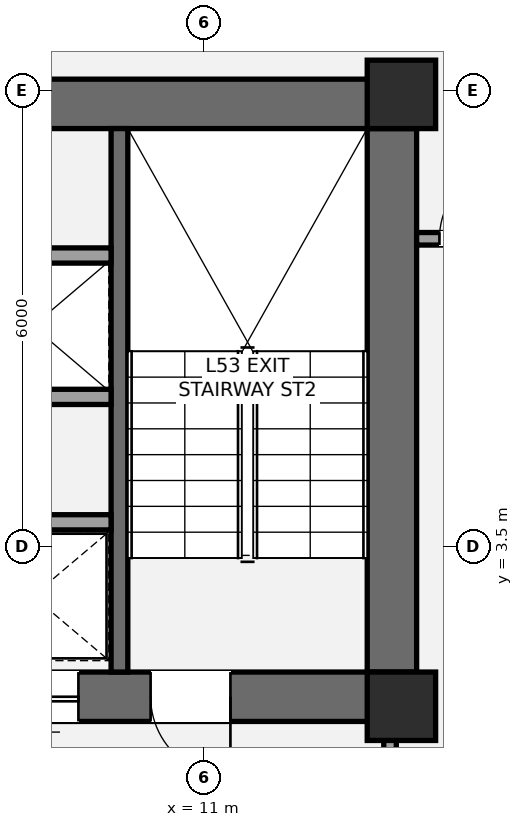
"""IFC4 building model, lengths in metres.
Left out: names, types, materials, properties, quantities, classifications, styles, units other than length and angle.
Written with IfcOpenShell. Run it as: python <this file> out.ifc"""

import sys

from ifc_helpers import new_model, si_unit, direction, frame, frame_2d, origin, origin_2d, place, context, subcontext, project, spatial, rectangle, extrude, element, fill, save


model = new_model("IFC4")
c1 = context("Model", 3, precision=1e-05, world=origin(), true_north=direction((0.0, 1.0)))
c2 = subcontext(c1, "Body", "Model", "MODEL_VIEW")
j1 = project(units=[si_unit("LENGTHUNIT", "METRE"), si_unit("PLANEANGLEUNIT", "RADIAN")], contexts=[c1])
p1 = place(None, origin())
s1 = spatial("IfcSite", under=j1, at=p1, CompositionType="ELEMENT")
p2 = place(p1, origin())
s2 = spatial("IfcBuilding", under=s1, at=p2, CompositionType="ELEMENT")
p3 = place(p2, frame((0.0, 0.0, 191.8)))
s3 = spatial("IfcBuildingStorey", under=s2, at=p3, CompositionType="ELEMENT", Elevation=191.8)
p4 = place(p3, frame((13.475, 1.2, 0.0), z_axis=(0.0, 0.0, 1.0), x_axis=(0.0, 1.0, 0.0)))
e1 = element("IfcWall", 1, at=p4, inside=s3, PredefinedType="SHEAR", context=c2, shape_type="SweptSolid", body=[
    extrude(rectangle(XDim=8.45, YDim=0.65, at=frame_2d((4.225, 0.0))), origin(), (0.0, 0.0, 1.0), 3.2),
])
p5 = place(p3, frame((4.475, 9.325, 0.0), z_axis=(0.0, 0.0, 1.0), x_axis=(1.0, 0.0, 0.0)))
e2 = element("IfcWall", 2, at=p5, inside=s3, PredefinedType="SHEAR", context=c2, shape_type="SweptSolid", body=[
    extrude(rectangle(XDim=9.325, YDim=0.65, at=frame_2d((4.663, 0.0))), origin(), (0.0, 0.0, 1.0), 3.2),
])
p6 = place(p3, frame((13.8, 1.525, 0.0), z_axis=(0.0, 0.0, 1.0), x_axis=(-1.0, 0.0, 0.0)))
e3 = element("IfcWall", 3, at=p6, inside=s3, PredefinedType="SHEAR", context=c2, shape_type="SweptSolid", body=[
    extrude(rectangle(XDim=8.925, YDim=0.65, at=frame_2d((4.462, 0.0))), origin(), (0.0, 0.0, 1.0), 3.2),
])
p7 = place(p6, frame((2.45, 0.0, 0.0)))
e4 = element("IfcOpeningElement", 4, at=p7, cuts=e3, PredefinedType="OPENING", context=c2, shape_type="SweptSolid", body=[
    extrude(rectangle(XDim=1.05, YDim=2.15, at=frame_2d((0.525, 1.075))), frame((0.0, 0.335, 0.0), z_axis=(0.0, -1.0, 0.0), x_axis=(1.0, 0.0, 0.0)), (0.0, 0.0, 1.0), 0.67),
])
p8 = place(p6, frame((4.45, 0.0, 0.0)))
e5 = element("IfcOpeningElement", 5, at=p8, cuts=e3, PredefinedType="OPENING", context=c2, shape_type="SweptSolid", body=[
    extrude(rectangle(XDim=1.1, YDim=2.2, at=frame_2d((0.55, 1.1))), frame((0.0, 0.335, 0.0), z_axis=(0.0, -1.0, 0.0), x_axis=(1.0, 0.0, 0.0)), (0.0, 0.0, 1.0), 0.67),
])
p9 = place(p3, frame((9.89, 1.85, 0.0), z_axis=(0.0, 0.0, 1.0), x_axis=(0.0, 1.0, 0.0)))
e6 = element("IfcWall", 6, at=p9, inside=s3, PredefinedType="SHEAR", context=c2, shape_type="SweptSolid", body=[
    extrude(rectangle(XDim=7.15, YDim=0.22, at=frame_2d((3.575, 0.0))), origin(), (0.0, 0.0, 1.0), 3.2),
])
for number, where, z_axis, x_axis in (
    (7, (13.6, 1.4, 0.0), (0.0, 0.0, 1.0), (1.0, 0.0, 0.0)),
    (8, (13.6, 9.45, 0.0), (0.0, 0.0, 1.0), (1.0, 0.0, 0.0)),
):
    element("IfcColumn", number, at=place(p3, frame(where, z_axis=z_axis, x_axis=x_axis)), inside=s3, PredefinedType="COLUMN", context=c2, shape_type="SweptSolid", body=[
        extrude(rectangle(XDim=0.9, YDim=0.9, at=origin_2d()), origin(), (0.0, 0.0, 1.0), 3.2),
    ])
p10 = place(p3, frame((13.45, -2.15, 0.0), z_axis=(0.0, 0.0, 1.0), x_axis=(0.0, 1.0, 0.0)))
e9 = element("IfcWall", 9, at=p10, inside=s3, PredefinedType="PARTITIONING", context=c2, shape_type="SweptSolid", body=[
    extrude(rectangle(XDim=3.4, YDim=0.165, at=frame_2d((1.7, 0.0))), origin(), (0.0, 0.0, 1.0), 2.473),
])
p11 = place(p10, frame((1.15, 0.0, 0.0)))
e10 = element("IfcOpeningElement", 10, at=p11, cuts=e9, PredefinedType="OPENING", context=c2, shape_type="SweptSolid", body=[
    extrude(rectangle(XDim=1.05, YDim=2.15, at=frame_2d((0.525, 1.075))), frame((0.0, 0.093, 0.0), z_axis=(0.0, -1.0, 0.0), x_axis=(1.0, 0.0, 0.0)), (0.0, 0.0, 1.0), 0.185),
])
p12 = place(p3, frame((5.525, 3.82, 0.0), z_axis=(0.0, 0.0, 1.0), x_axis=(1.0, 0.0, 0.0)))
e11 = element("IfcWall", 11, at=p12, inside=s3, PredefinedType="SOLIDWALL", context=c2, shape_type="SweptSolid", body=[
    extrude(rectangle(XDim=4.255, YDim=0.2, at=frame_2d((2.127, 0.0))), origin(), (0.0, 0.0, 1.0), 3.02),
])
p13 = place(p12, frame((0.65, 0.0, 0.0)))
e12 = element("IfcOpeningElement", 12, at=p13, cuts=e11, PredefinedType="OPENING", context=c2, shape_type="SweptSolid", body=[
    extrude(rectangle(XDim=1.2, YDim=2.2, at=frame_2d((0.6, 1.1))), frame((0.0, 0.11, 0.0), z_axis=(0.0, -1.0, 0.0), x_axis=(1.0, 0.0, 0.0)), (0.0, 0.0, 1.0), 0.22),
])
for number, where, z_axis, x_axis in (
    (13, (5.525, 5.47, 0.0), (0.0, 0.0, 1.0), (1.0, 0.0, 0.0)),
    (14, (5.525, 7.33, 0.0), (0.0, 0.0, 1.0), (1.0, 0.0, 0.0)),
):
    element("IfcWall", number, at=place(p3, frame(where, z_axis=z_axis, x_axis=x_axis)), inside=s3, PredefinedType="SOLIDWALL", context=c2, shape_type="SweptSolid", body=[
        extrude(rectangle(XDim=4.255, YDim=0.2, at=frame_2d((2.127, 0.0))), origin(), (0.0, 0.0, 1.0), 3.02),
    ])
p14 = place(p3, frame((13.8, 7.55, 0.0), z_axis=(0.0, 0.0, 1.0), x_axis=(1.0, 0.0, 0.0)))
e15 = element("IfcWall", 15, at=p14, inside=s3, PredefinedType="PARTITIONING", context=c2, shape_type="SweptSolid", body=[
    extrude(rectangle(XDim=1.75, YDim=0.165, at=frame_2d((0.875, 0.0))), origin(), (0.0, 0.0, 1.0), 3.02),
])
p15 = place(p14, frame((0.3, 0.0, 0.0)))
e16 = element("IfcOpeningElement", 16, at=p15, cuts=e15, PredefinedType="OPENING", context=c2, shape_type="SweptSolid", body=[
    extrude(rectangle(XDim=1.0, YDim=2.15, at=frame_2d((0.5, 1.075))), frame((0.0, 0.093, 0.0), z_axis=(0.0, -1.0, 0.0), x_axis=(1.0, 0.0, 0.0)), (0.0, 0.0, 1.0), 0.185),
])
p16 = place(p7, origin())
e17 = element("IfcDoor", 17, at=p16, inside=s3, OperationType="SINGLE_SWING_LEFT", PredefinedType="DOOR", context=c2, shape_type="SweptSolid", body=[
    extrude(rectangle(XDim=1.05, YDim=2.15, at=frame_2d((0.525, 1.075))), frame((0.0, 0.025, 0.0), z_axis=(0.0, -1.0, 0.0), x_axis=(1.0, 0.0, 0.0)), (0.0, 0.0, 1.0), 0.05),
])
fill(e4, e17)
p17 = place(p8, origin())
e18 = element("IfcDoor", 18, at=p17, inside=s3, OperationType="SLIDING_TO_LEFT", PredefinedType="DOOR", context=c2, shape_type="SweptSolid", body=[
    extrude(rectangle(XDim=1.1, YDim=2.2, at=frame_2d((0.55, 1.1))), frame((0.0, 0.025, 0.0), z_axis=(0.0, -1.0, 0.0), x_axis=(1.0, 0.0, 0.0)), (0.0, 0.0, 1.0), 0.05),
])
fill(e5, e18)
p18 = place(p15, origin())
e19 = element("IfcDoor", 19, at=p18, inside=s3, OperationType="SINGLE_SWING_RIGHT", PredefinedType="DOOR", context=c2, shape_type="SweptSolid", body=[
    extrude(rectangle(XDim=1.0, YDim=2.15, at=frame_2d((0.5, 1.075))), frame((0.0, 0.025, 0.0), z_axis=(0.0, -1.0, 0.0), x_axis=(1.0, 0.0, 0.0)), (0.0, 0.0, 1.0), 0.05),
])
fill(e16, e19)
save(model, sys.argv[1])
